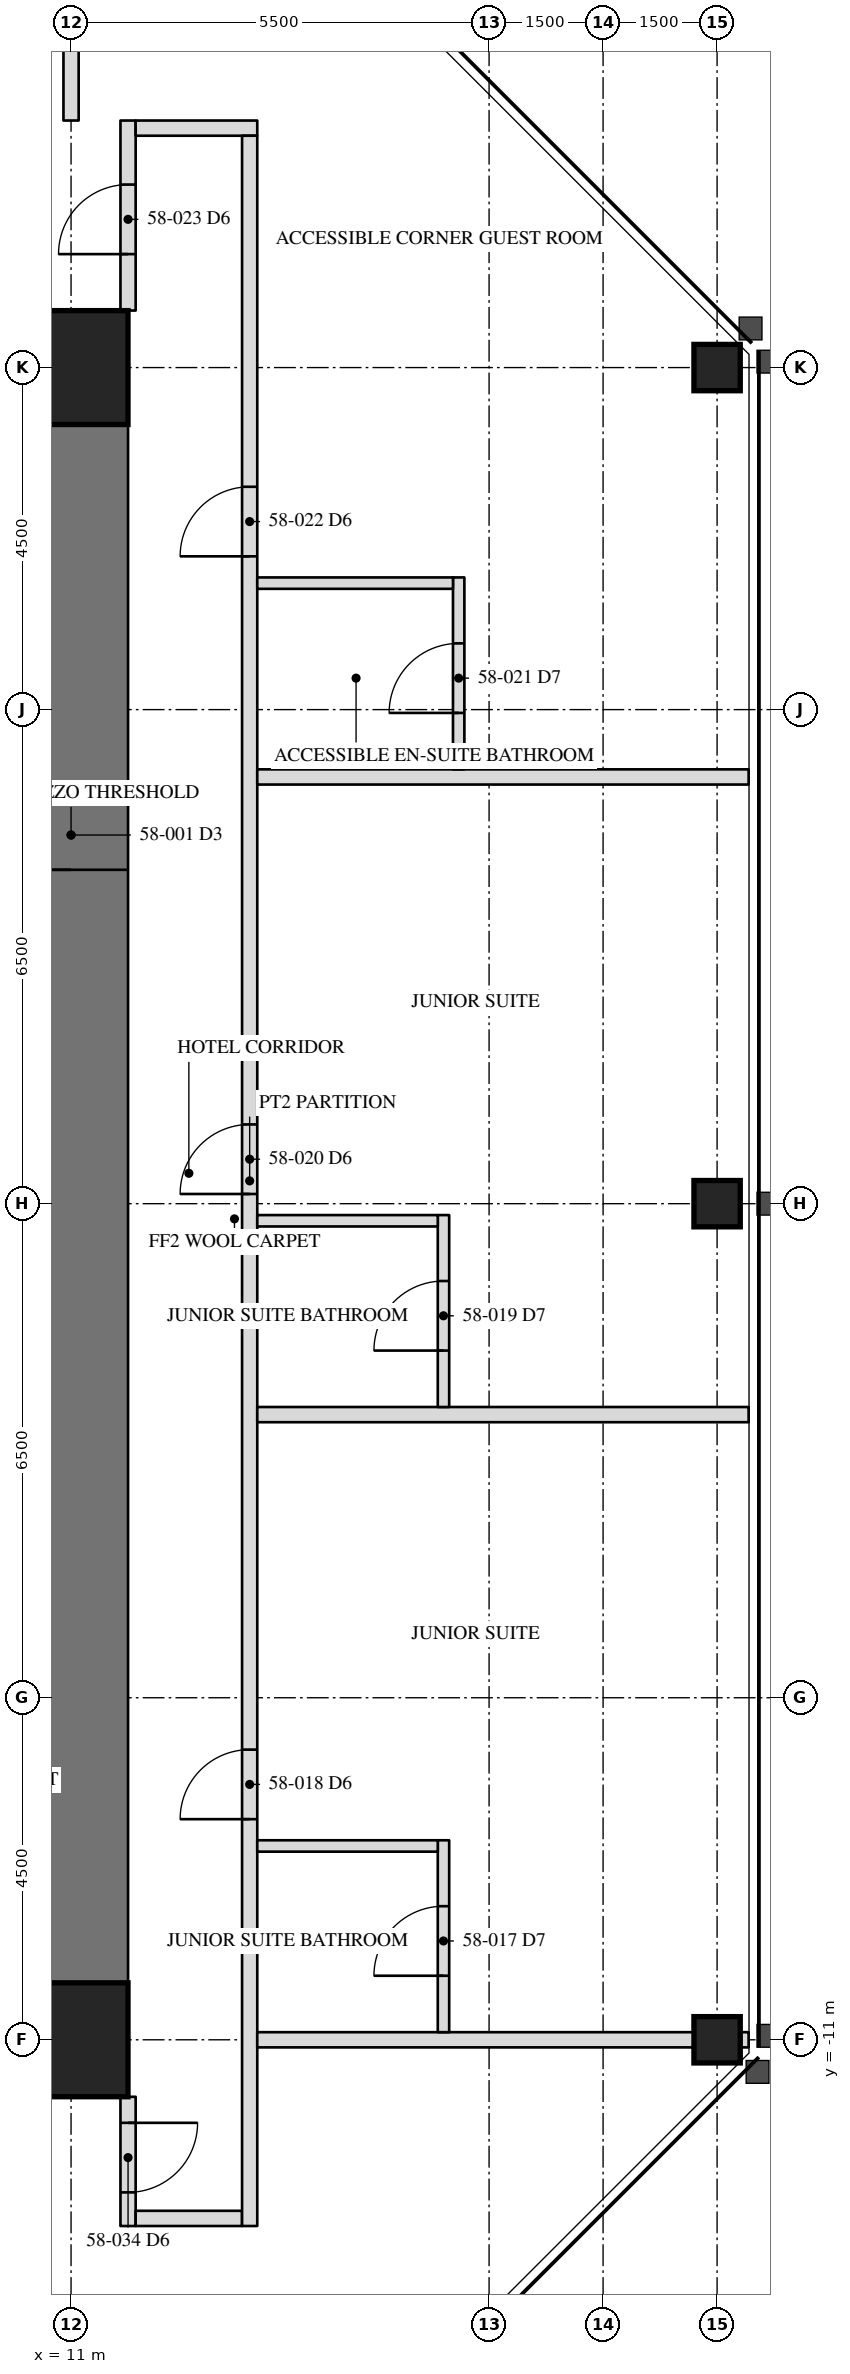
"""IFC4 building model, lengths in metres.
Left out: names, types, materials, properties, quantities, classifications, styles, units other than length and angle.
Written with IfcOpenShell. Run it as: python <this file> out.ifc"""

import sys

from ifc_helpers import new_model, si_unit, direction, frame, frame_2d, origin, origin_2d, place, context, subcontext, project, spatial, rectangle, hollow_rectangle, extrude, element, fill, save


model = new_model("IFC4")
c1 = context("Model", 3, precision=1e-05, world=origin(), true_north=direction((0.0, 1.0)))
c2 = subcontext(c1, "Body", "Model", "MODEL_VIEW")
j1 = project(units=[si_unit("LENGTHUNIT", "METRE"), si_unit("PLANEANGLEUNIT", "RADIAN")], contexts=[c1])
p1 = place(None, origin())
s1 = spatial("IfcSite", under=j1, at=p1, CompositionType="ELEMENT")
p2 = place(p1, origin())
s2 = spatial("IfcBuilding", under=s1, at=p2, CompositionType="ELEMENT")
p3 = place(p2, frame((0.0, 0.0, 239.7)))
s3 = spatial("IfcBuildingStorey", under=s2, at=p3, CompositionType="ELEMENT", Elevation=239.7)
for number, where, z_axis, x_axis in (
    (1, (19.5, -11.0, 0.0), (0.0, 0.0, 1.0), (0.0, 1.0, 0.0)),
    (2, (19.5, 0.0, 0.0), (0.0, 0.0, 1.0), (0.0, 1.0, 0.0)),
    (3, (19.5, 11.0, 0.0), (0.0, 0.0, 1.0), (0.0, 1.0, 0.0)),
):
    element("IfcColumn", number, at=place(p3, frame(where, z_axis=z_axis, x_axis=x_axis)), inside=s3, PredefinedType="COLUMN", context=c2, shape_type="SweptSolid", body=[
        extrude(hollow_rectangle(XDim=0.61, YDim=0.61, WallThickness=0.051, at=origin_2d()), origin(), (0.0, 0.0, 1.0), 3.5),
    ])
p4 = place(p3, frame((11.0, -11.0, 0.0), z_axis=(0.0, 0.0, 1.0), x_axis=(0.0, 1.0, 0.0)))
e4 = element("IfcWall", 4, at=p4, inside=s3, PredefinedType="SHEAR", context=c2, shape_type="SweptSolid", body=[
    extrude(rectangle(XDim=22.0, YDim=1.5, at=frame_2d((11.0, 0.0))), origin(), (0.0, 0.0, 1.0), 3.5),
])
p5 = place(p4, frame((15.393, 0.0, 0.0)))
e5 = element("IfcOpeningElement", 5, at=p5, cuts=e4, PredefinedType="OPENING", context=c2, shape_type="SweptSolid", body=[
    extrude(rectangle(XDim=0.915, YDim=2.134, at=frame_2d((0.458, 1.067))), frame((0.0, 0.76, 0.0), z_axis=(0.0, -1.0, 0.0), x_axis=(1.0, 0.0, 0.0)), (0.0, 0.0, 1.0), 1.52),
])
for number, where, z_axis, x_axis in (
    (6, (11.0, 11.0, 0.0), (0.0, 0.0, 1.0), (-1.0, 0.0, 0.0)),
    (7, (6.5, -11.0, 0.0), (0.0, 0.0, 1.0), (1.0, 0.0, 0.0)),
):
    element("IfcWall", number, at=place(p3, frame(where, z_axis=z_axis, x_axis=x_axis)), inside=s3, PredefinedType="SHEAR", context=c2, shape_type="SweptSolid", body=[
        extrude(rectangle(XDim=4.5, YDim=1.5, at=frame_2d((2.25, 0.0))), origin(), (0.0, 0.0, 1.0), 3.5),
    ])
for number, where, z_axis, x_axis in (
    (8, (11.0, 11.0, 0.0), (0.0, 0.0, 1.0), (1.0, 0.0, 0.0)),
    (9, (11.0, -11.0, 0.0), (0.0, 0.0, 1.0), (1.0, 0.0, 0.0)),
):
    element("IfcColumn", number, at=place(p3, frame(where, z_axis=z_axis, x_axis=x_axis)), inside=s3, PredefinedType="COLUMN", context=c2, shape_type="SweptSolid", body=[
        extrude(hollow_rectangle(XDim=1.499, YDim=1.499, WallThickness=0.102, at=origin_2d()), origin(), (0.0, 0.0, 1.0), 3.5),
    ])
p6 = place(p3, frame((11.75, 11.75, 0.0), z_axis=(0.0, 0.0, 1.0), x_axis=(0.0, 1.0, 0.0)))
e10 = element("IfcWall", 10, at=p6, inside=s3, PredefinedType="PARTITIONING", context=c2, shape_type="SweptSolid", body=[
    extrude(rectangle(XDim=2.5, YDim=0.2, at=frame_2d((1.25, 0.0))), origin(), (0.0, 0.0, 1.0), 3.31),
])
p7 = place(p6, frame((0.742, 0.0, 0.0)))
e11 = element("IfcOpeningElement", 11, at=p7, cuts=e10, PredefinedType="OPENING", context=c2, shape_type="SweptSolid", body=[
    extrude(rectangle(XDim=0.915, YDim=2.134, at=frame_2d((0.458, 1.067))), frame((0.0, 0.11, 0.0), z_axis=(0.0, -1.0, 0.0), x_axis=(1.0, 0.0, 0.0)), (0.0, 0.0, 1.0), 0.22),
])
p8 = place(p3, frame((13.45, 14.15, 0.0), z_axis=(0.0, 0.0, 1.0), x_axis=(-1.0, 0.0, 0.0)))
e12 = element("IfcWall", 12, at=p8, inside=s3, PredefinedType="PARTITIONING", context=c2, shape_type="SweptSolid", body=[
    extrude(rectangle(XDim=1.6, YDim=0.2, at=frame_2d((0.8, 0.0))), origin(), (0.0, 0.0, 1.0), 3.31),
])
p9 = place(p3, frame((11.75, -11.75, 0.0), z_axis=(0.0, 0.0, 1.0), x_axis=(0.0, -1.0, 0.0)))
e13 = element("IfcWall", 13, at=p9, inside=s3, PredefinedType="PARTITIONING", context=c2, shape_type="SweptSolid", body=[
    extrude(rectangle(XDim=1.7, YDim=0.2, at=frame_2d((0.85, 0.0))), origin(), (0.0, 0.0, 1.0), 3.31),
])
p10 = place(p9, frame((0.343, 0.0, 0.0)))
e14 = element("IfcOpeningElement", 14, at=p10, cuts=e13, PredefinedType="OPENING", context=c2, shape_type="SweptSolid", body=[
    extrude(rectangle(XDim=0.915, YDim=2.134, at=frame_2d((0.458, 1.067))), frame((0.0, 0.11, 0.0), z_axis=(0.0, -1.0, 0.0), x_axis=(1.0, 0.0, 0.0)), (0.0, 0.0, 1.0), 0.22),
])
p11 = place(p3, frame((11.85, -13.35, 0.0), z_axis=(0.0, 0.0, 1.0), x_axis=(1.0, 0.0, 0.0)))
e15 = element("IfcWall", 15, at=p11, inside=s3, PredefinedType="PARTITIONING", context=c2, shape_type="SweptSolid", body=[
    extrude(rectangle(XDim=1.4, YDim=0.2, at=frame_2d((0.7, 0.0))), origin(), (0.0, 0.0, 1.0), 3.31),
])
p12 = place(p3, frame((13.35, -13.45, 0.0), z_axis=(0.0, 0.0, 1.0), x_axis=(0.0, 1.0, 0.0)))
e16 = element("IfcWall", 16, at=p12, inside=s3, PredefinedType="PARTITIONING", context=c2, shape_type="SweptSolid", body=[
    extrude(rectangle(XDim=27.5, YDim=0.2, at=frame_2d((13.75, 0.0))), origin(), (0.0, 0.0, 1.0), 3.31),
])
p13 = place(p12, frame((5.353, 0.0, 0.0)))
e17 = element("IfcOpeningElement", 17, at=p13, cuts=e16, PredefinedType="OPENING", context=c2, shape_type="SweptSolid", body=[
    extrude(rectangle(XDim=0.915, YDim=2.134, at=frame_2d((0.458, 1.067))), frame((0.0, 0.11, 0.0), z_axis=(0.0, -1.0, 0.0), x_axis=(1.0, 0.0, 0.0)), (0.0, 0.0, 1.0), 0.22),
])
p14 = place(p12, frame((13.577, 0.0, 0.0)))
e18 = element("IfcOpeningElement", 18, at=p14, cuts=e16, PredefinedType="OPENING", context=c2, shape_type="SweptSolid", body=[
    extrude(rectangle(XDim=0.915, YDim=2.134, at=frame_2d((0.458, 1.067))), frame((0.0, 0.11, 0.0), z_axis=(0.0, -1.0, 0.0), x_axis=(1.0, 0.0, 0.0)), (0.0, 0.0, 1.0), 0.22),
])
p15 = place(p12, frame((21.967, 0.0, 0.0)))
e19 = element("IfcOpeningElement", 19, at=p15, cuts=e16, PredefinedType="OPENING", context=c2, shape_type="SweptSolid", body=[
    extrude(rectangle(XDim=0.915, YDim=2.134, at=frame_2d((0.458, 1.067))), frame((0.0, 0.11, 0.0), z_axis=(0.0, -1.0, 0.0), x_axis=(1.0, 0.0, 0.0)), (0.0, 0.0, 1.0), 0.22),
])
p16 = place(p3, frame((13.45, -11.0, 0.0), z_axis=(0.0, 0.0, 1.0), x_axis=(1.0, 0.0, 0.0)))
e20 = element("IfcWall", 20, at=p16, inside=s3, PredefinedType="PARTITIONING", context=c2, shape_type="SweptSolid", body=[
    extrude(rectangle(XDim=6.465, YDim=0.2, at=frame_2d((3.232, 0.0))), origin(), (0.0, 0.0, 1.0), 2.802),
])
for number, where, z_axis, x_axis in (
    (21, (13.45, -2.775, 0.0), (0.0, 0.0, 1.0), (1.0, 0.0, 0.0)),
    (22, (13.45, 5.614, 0.0), (0.0, 0.0, 1.0), (1.0, 0.0, 0.0)),
):
    element("IfcWall", number, at=place(p3, frame(where, z_axis=z_axis, x_axis=x_axis)), inside=s3, PredefinedType="PARTITIONING", context=c2, shape_type="SweptSolid", body=[
        extrude(rectangle(XDim=6.465, YDim=0.2, at=frame_2d((3.232, 0.0))), origin(), (0.0, 0.0, 1.0), 3.31),
    ])
p17 = place(p3, frame((15.9, -10.9, 0.0), z_axis=(0.0, 0.0, 1.0), x_axis=(0.0, 1.0, 0.0)))
e23 = element("IfcWall", 23, at=p17, inside=s3, PredefinedType="PARTITIONING", context=c2, shape_type="SweptSolid", body=[
    extrude(rectangle(XDim=2.525, YDim=0.15, at=frame_2d((1.262, 0.0))), origin(), (0.0, 0.0, 1.0), 3.31),
])
p18 = place(p17, frame((0.742, 0.0, 0.0)))
e24 = element("IfcOpeningElement", 24, at=p18, cuts=e23, PredefinedType="OPENING", context=c2, shape_type="SweptSolid", body=[
    extrude(rectangle(XDim=0.915, YDim=2.032, at=frame_2d((0.458, 1.016))), frame((0.0, 0.085, 0.0), z_axis=(0.0, -1.0, 0.0), x_axis=(1.0, 0.0, 0.0)), (0.0, 0.0, 1.0), 0.17),
])
p19 = place(p3, frame((13.45, -8.45, 0.0), z_axis=(0.0, 0.0, 1.0), x_axis=(1.0, 0.0, 0.0)))
e25 = element("IfcWall", 25, at=p19, inside=s3, PredefinedType="PARTITIONING", context=c2, shape_type="SweptSolid", body=[
    extrude(rectangle(XDim=2.375, YDim=0.15, at=frame_2d((1.188, 0.0))), origin(), (0.0, 0.0, 1.0), 3.31),
])
p20 = place(p3, frame((15.9, -2.675, 0.0), z_axis=(0.0, 0.0, 1.0), x_axis=(0.0, 1.0, 0.0)))
e26 = element("IfcWall", 26, at=p20, inside=s3, PredefinedType="PARTITIONING", context=c2, shape_type="SweptSolid", body=[
    extrude(rectangle(XDim=2.525, YDim=0.15, at=frame_2d((1.263, 0.0))), origin(), (0.0, 0.0, 1.0), 3.31),
])
p21 = place(p20, frame((0.742, 0.0, 0.0)))
e27 = element("IfcOpeningElement", 27, at=p21, cuts=e26, PredefinedType="OPENING", context=c2, shape_type="SweptSolid", body=[
    extrude(rectangle(XDim=0.915, YDim=2.032, at=frame_2d((0.458, 1.016))), frame((0.0, 0.085, 0.0), z_axis=(0.0, -1.0, 0.0), x_axis=(1.0, 0.0, 0.0)), (0.0, 0.0, 1.0), 0.17),
])
p22 = place(p3, frame((13.45, -0.225, 0.0), z_axis=(0.0, 0.0, 1.0), x_axis=(1.0, 0.0, 0.0)))
e28 = element("IfcWall", 28, at=p22, inside=s3, PredefinedType="PARTITIONING", context=c2, shape_type="SweptSolid", body=[
    extrude(rectangle(XDim=2.375, YDim=0.15, at=frame_2d((1.188, 0.0))), origin(), (0.0, 0.0, 1.0), 3.31),
])
p23 = place(p3, frame((16.1, 5.714, 0.0), z_axis=(0.0, 0.0, 1.0), x_axis=(0.0, 1.0, 0.0)))
e29 = element("IfcWall", 29, at=p23, inside=s3, PredefinedType="PARTITIONING", context=c2, shape_type="SweptSolid", body=[
    extrude(rectangle(XDim=2.525, YDim=0.15, at=frame_2d((1.262, 0.0))), origin(), (0.0, 0.0, 1.0), 3.31),
])
p24 = place(p23, frame((0.742, 0.0, 0.0)))
e30 = element("IfcOpeningElement", 30, at=p24, cuts=e29, PredefinedType="OPENING", context=c2, shape_type="SweptSolid", body=[
    extrude(rectangle(XDim=0.915, YDim=2.032, at=frame_2d((0.458, 1.016))), frame((0.0, 0.085, 0.0), z_axis=(0.0, -1.0, 0.0), x_axis=(1.0, 0.0, 0.0)), (0.0, 0.0, 1.0), 0.17),
])
p25 = place(p3, frame((13.45, 8.164, 0.0), z_axis=(0.0, 0.0, 1.0), x_axis=(1.0, 0.0, 0.0)))
e31 = element("IfcWall", 31, at=p25, inside=s3, PredefinedType="PARTITIONING", context=c2, shape_type="SweptSolid", body=[
    extrude(rectangle(XDim=2.575, YDim=0.15, at=frame_2d((1.288, 0.0))), origin(), (0.0, 0.0, 1.0), 3.31),
])
p26 = place(p3, frame((11.0, 14.25, 0.0), z_axis=(0.0, 0.0, 1.0), x_axis=(0.0, 1.0, 0.0)))
e32 = element("IfcWall", 32, at=p26, inside=s3, PredefinedType="PARTITIONING", context=c2, shape_type="SweptSolid", body=[
    extrude(rectangle(XDim=5.665, YDim=0.2, at=frame_2d((2.833, 0.0))), origin(), (0.0, 0.0, 1.0), 2.802),
])
p27 = place(p5, origin())
e33 = element("IfcDoor", 33, at=p27, inside=s3, OperationType="SINGLE_SWING_RIGHT", PredefinedType="DOOR", context=c2, shape_type="SweptSolid", body=[
    extrude(rectangle(XDim=0.915, YDim=2.134, at=frame_2d((0.458, 1.067))), frame((0.0, -0.675, 0.0), z_axis=(0.0, -1.0, 0.0), x_axis=(1.0, 0.0, 0.0)), (0.0, 0.0, 1.0), 0.05),
])
fill(e5, e33)
p28 = place(p18, origin())
e34 = element("IfcDoor", 34, at=p28, inside=s3, OperationType="SINGLE_SWING_LEFT", PredefinedType="DOOR", context=c2, shape_type="SweptSolid", body=[
    extrude(rectangle(XDim=0.915, YDim=2.032, at=frame_2d((0.458, 1.016))), frame((0.0, 0.025, 0.0), z_axis=(0.0, -1.0, 0.0), x_axis=(1.0, 0.0, 0.0)), (0.0, 0.0, 1.0), 0.05),
])
fill(e24, e34)
p29 = place(p13, origin())
e35 = element("IfcDoor", 35, at=p29, inside=s3, OperationType="SINGLE_SWING_LEFT", PredefinedType="DOOR", context=c2, shape_type="SweptSolid", body=[
    extrude(rectangle(XDim=0.915, YDim=2.134, at=frame_2d((0.458, 1.067))), frame((0.0, 0.025, 0.0), z_axis=(0.0, -1.0, 0.0), x_axis=(1.0, 0.0, 0.0)), (0.0, 0.0, 1.0), 0.05),
])
fill(e17, e35)
p30 = place(p21, origin())
e36 = element("IfcDoor", 36, at=p30, inside=s3, OperationType="SINGLE_SWING_LEFT", PredefinedType="DOOR", context=c2, shape_type="SweptSolid", body=[
    extrude(rectangle(XDim=0.915, YDim=2.032, at=frame_2d((0.458, 1.016))), frame((0.0, 0.025, 0.0), z_axis=(0.0, -1.0, 0.0), x_axis=(1.0, 0.0, 0.0)), (0.0, 0.0, 1.0), 0.05),
])
fill(e27, e36)
p31 = place(p14, origin())
e37 = element("IfcDoor", 37, at=p31, inside=s3, OperationType="SINGLE_SWING_LEFT", PredefinedType="DOOR", context=c2, shape_type="SweptSolid", body=[
    extrude(rectangle(XDim=0.915, YDim=2.134, at=frame_2d((0.458, 1.067))), frame((0.0, 0.025, 0.0), z_axis=(0.0, -1.0, 0.0), x_axis=(1.0, 0.0, 0.0)), (0.0, 0.0, 1.0), 0.05),
])
fill(e18, e37)
p32 = place(p24, origin())
e38 = element("IfcDoor", 38, at=p32, inside=s3, OperationType="SINGLE_SWING_LEFT", PredefinedType="DOOR", context=c2, shape_type="SweptSolid", body=[
    extrude(rectangle(XDim=0.915, YDim=2.032, at=frame_2d((0.458, 1.016))), frame((0.0, 0.025, 0.0), z_axis=(0.0, -1.0, 0.0), x_axis=(1.0, 0.0, 0.0)), (0.0, 0.0, 1.0), 0.05),
])
fill(e30, e38)
p33 = place(p15, origin())
e39 = element("IfcDoor", 39, at=p33, inside=s3, OperationType="SINGLE_SWING_LEFT", PredefinedType="DOOR", context=c2, shape_type="SweptSolid", body=[
    extrude(rectangle(XDim=0.915, YDim=2.134, at=frame_2d((0.458, 1.067))), frame((0.0, 0.025, 0.0), z_axis=(0.0, -1.0, 0.0), x_axis=(1.0, 0.0, 0.0)), (0.0, 0.0, 1.0), 0.05),
])
fill(e19, e39)
p34 = place(p7, origin())
e40 = element("IfcDoor", 40, at=p34, inside=s3, OperationType="SINGLE_SWING_LEFT", PredefinedType="DOOR", context=c2, shape_type="SweptSolid", body=[
    extrude(rectangle(XDim=0.915, YDim=2.134, at=frame_2d((0.458, 1.067))), frame((0.0, 0.025, 0.0), z_axis=(0.0, -1.0, 0.0), x_axis=(1.0, 0.0, 0.0)), (0.0, 0.0, 1.0), 0.05),
])
fill(e11, e40)
p35 = place(p10, origin())
e41 = element("IfcDoor", 41, at=p35, inside=s3, OperationType="SINGLE_SWING_LEFT", PredefinedType="DOOR", context=c2, shape_type="SweptSolid", body=[
    extrude(rectangle(XDim=0.915, YDim=2.134, at=frame_2d((0.458, 1.067))), frame((0.0, 0.025, 0.0), z_axis=(0.0, -1.0, 0.0), x_axis=(1.0, 0.0, 0.0)), (0.0, 0.0, 1.0), 0.05),
])
fill(e14, e41)
save(model, sys.argv[1])
